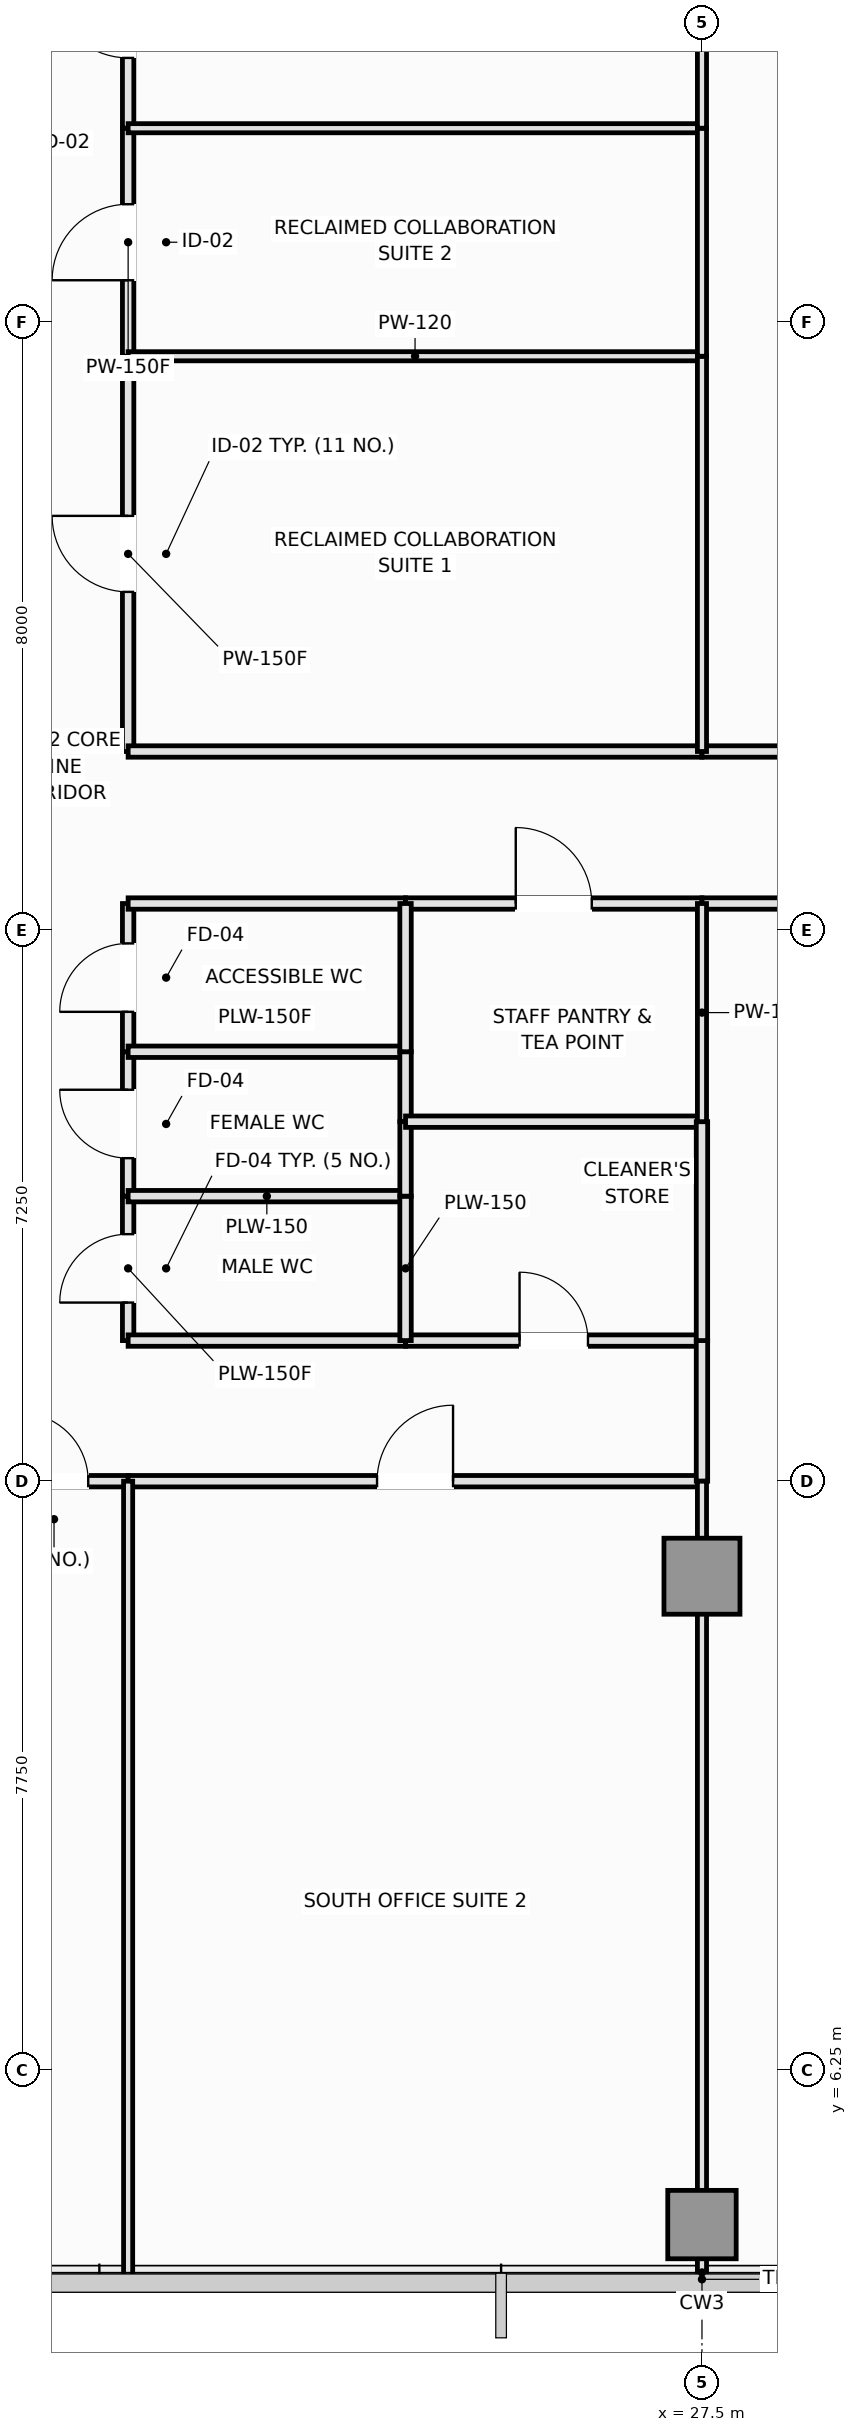
"""IFC4 building model, lengths in metres.
Left out: names, types, materials, properties, quantities, classifications, styles, units other than length and angle.
Written with IfcOpenShell. Run it as: python <this file> out.ifc"""

import sys

from ifc_helpers import new_model, si_unit, direction, frame, frame_2d, origin, origin_2d, place, context, subcontext, project, spatial, rectangle, extrude, element, fill, save


model = new_model("IFC4")
c1 = context("Model", 3, precision=1e-05, world=origin(), true_north=direction((0.0, 1.0)))
c2 = subcontext(c1, "Body", "Model", "MODEL_VIEW")
j1 = project(units=[si_unit("LENGTHUNIT", "METRE"), si_unit("PLANEANGLEUNIT", "RADIAN")], contexts=[c1])
p1 = place(None, origin())
s1 = spatial("IfcSite", under=j1, at=p1, CompositionType="ELEMENT")
p2 = place(p1, origin())
s2 = spatial("IfcBuilding", under=s1, at=p2, CompositionType="ELEMENT")
p3 = place(p2, frame((0.0, 0.0, 169.7)))
s3 = spatial("IfcBuildingStorey", under=s2, at=p3, CompositionType="ELEMENT", Elevation=169.7)
p4 = place(p3, frame((27.5, 12.75, 0.0), z_axis=(0.0, 0.0, 1.0), x_axis=(1.0, 0.0, 0.0)))
e1 = element("IfcColumn", 1, at=p4, inside=s3, PredefinedType="COLUMN", context=c2, shape_type="SweptSolid", body=[
    extrude(rectangle(XDim=1.0, YDim=1.0, at=origin_2d()), origin(), (0.0, 0.0, 1.0), 3.55),
])
p5 = place(p3, frame((27.5, 4.22, 0.0), z_axis=(0.0, 0.0, 1.0), x_axis=(1.0, 0.0, 0.0)))
e2 = element("IfcColumn", 2, at=p5, inside=s3, PredefinedType="COLUMN", context=c2, shape_type="SweptSolid", body=[
    extrude(rectangle(XDim=0.9, YDim=0.9, at=origin_2d()), origin(), (0.0, 0.0, 1.0), 3.55),
])
p6 = place(p3, frame((19.95, 15.85, 0.0), z_axis=(0.0, 0.0, 1.0), x_axis=(0.0, 1.0, 0.0)))
e3 = element("IfcWall", 3, at=p6, inside=s3, PredefinedType="PLUMBINGWALL", context=c2, shape_type="SweptSolid", body=[
    extrude(rectangle(XDim=1.9, YDim=0.15, at=frame_2d((0.95, 0.0))), origin(), (0.0, 0.0, 1.0), 3.35),
])
p7 = place(p6, frame((0.5, 0.0, 0.0)))
e4 = element("IfcOpeningElement", 4, at=p7, cuts=e3, PredefinedType="OPENING", context=c2, shape_type="SweptSolid", body=[
    extrude(rectangle(XDim=0.9, YDim=2.1, at=frame_2d((0.45, 1.05))), frame((0.0, 0.085, 0.0), z_axis=(0.0, -1.0, 0.0), x_axis=(1.0, 0.0, 0.0)), (0.0, 0.0, 1.0), 0.17),
])
p8 = place(p3, frame((19.95, 17.75, 0.0), z_axis=(0.0, 0.0, 1.0), x_axis=(0.0, 1.0, 0.0)))
e5 = element("IfcWall", 5, at=p8, inside=s3, PredefinedType="PLUMBINGWALL", context=c2, shape_type="SweptSolid", body=[
    extrude(rectangle(XDim=1.9, YDim=0.15, at=frame_2d((0.95, 0.0))), origin(), (0.0, 0.0, 1.0), 3.35),
])
p9 = place(p8, frame((0.5, 0.0, 0.0)))
e6 = element("IfcOpeningElement", 6, at=p9, cuts=e5, PredefinedType="OPENING", context=c2, shape_type="SweptSolid", body=[
    extrude(rectangle(XDim=0.9, YDim=2.1, at=frame_2d((0.45, 1.05))), frame((0.0, 0.085, 0.0), z_axis=(0.0, -1.0, 0.0), x_axis=(1.0, 0.0, 0.0)), (0.0, 0.0, 1.0), 0.17),
])
p10 = place(p3, frame((19.95, 19.65, 0.0), z_axis=(0.0, 0.0, 1.0), x_axis=(0.0, 1.0, 0.0)))
e7 = element("IfcWall", 7, at=p10, inside=s3, PredefinedType="PLUMBINGWALL", context=c2, shape_type="SweptSolid", body=[
    extrude(rectangle(XDim=1.95, YDim=0.15, at=frame_2d((0.975, 0.0))), origin(), (0.0, 0.0, 1.0), 3.35),
])
p11 = place(p10, frame((0.525, 0.0, 0.0)))
e8 = element("IfcOpeningElement", 8, at=p11, cuts=e7, PredefinedType="OPENING", context=c2, shape_type="SweptSolid", body=[
    extrude(rectangle(XDim=0.9, YDim=2.1, at=frame_2d((0.45, 1.05))), frame((0.0, 0.085, 0.0), z_axis=(0.0, -1.0, 0.0), x_axis=(1.0, 0.0, 0.0)), (0.0, 0.0, 1.0), 0.17),
])
p12 = place(p3, frame((19.95, 23.6, 0.0), z_axis=(0.0, 0.0, 1.0), x_axis=(0.0, 1.0, 0.0)))
e9 = element("IfcWall", 9, at=p12, inside=s3, PredefinedType="PARTITIONING", context=c2, shape_type="SweptSolid", body=[
    extrude(rectangle(XDim=5.2, YDim=0.15, at=frame_2d((2.6, 0.0))), origin(), (0.0, 0.0, 1.0), 3.35),
])
p13 = place(p12, frame((2.1, 0.0, 0.0)))
e10 = element("IfcOpeningElement", 10, at=p13, cuts=e9, PredefinedType="OPENING", context=c2, shape_type="SweptSolid", body=[
    extrude(rectangle(XDim=1.0, YDim=2.15, at=frame_2d((0.5, 1.075))), frame((0.0, 0.085, 0.0), z_axis=(0.0, -1.0, 0.0), x_axis=(1.0, 0.0, 0.0)), (0.0, 0.0, 1.0), 0.17),
])
p14 = place(p3, frame((19.95, 28.8, 0.0), z_axis=(0.0, 0.0, 1.0), x_axis=(0.0, 1.0, 0.0)))
e11 = element("IfcWall", 11, at=p14, inside=s3, PredefinedType="PARTITIONING", context=c2, shape_type="SweptSolid", body=[
    extrude(rectangle(XDim=3.0, YDim=0.15, at=frame_2d((1.5, 0.0))), origin(), (0.0, 0.0, 1.0), 3.35),
])
p15 = place(p14, frame((1.0, 0.0, 0.0)))
e12 = element("IfcOpeningElement", 12, at=p15, cuts=e11, PredefinedType="OPENING", context=c2, shape_type="SweptSolid", body=[
    extrude(rectangle(XDim=1.0, YDim=2.15, at=frame_2d((0.5, 1.075))), frame((0.0, 0.085, 0.0), z_axis=(0.0, -1.0, 0.0), x_axis=(1.0, 0.0, 0.0)), (0.0, 0.0, 1.0), 0.17),
])
p16 = place(p3, frame((19.95, 31.8, 0.0), z_axis=(0.0, 0.0, 1.0), x_axis=(0.0, 1.0, 0.0)))
e13 = element("IfcWall", 13, at=p16, inside=s3, PredefinedType="PARTITIONING", context=c2, shape_type="SweptSolid", body=[
    extrude(rectangle(XDim=2.85, YDim=0.15, at=frame_2d((1.425, 0.0))), origin(), (0.0, 0.0, 1.0), 3.35),
])
p17 = place(p16, frame((0.925, 0.0, 0.0)))
e14 = element("IfcOpeningElement", 14, at=p17, cuts=e13, PredefinedType="OPENING", context=c2, shape_type="SweptSolid", body=[
    extrude(rectangle(XDim=1.0, YDim=2.15, at=frame_2d((0.5, 1.075))), frame((0.0, 0.085, 0.0), z_axis=(0.0, -1.0, 0.0), x_axis=(1.0, 0.0, 0.0)), (0.0, 0.0, 1.0), 0.17),
])
p18 = place(p3, frame((18.0, 14.0, 0.0), z_axis=(0.0, 0.0, 1.0), x_axis=(1.0, 0.0, 0.0)))
e15 = element("IfcWall", 15, at=p18, inside=s3, PredefinedType="PARTITIONING", context=c2, shape_type="SweptSolid", body=[
    extrude(rectangle(XDim=1.95, YDim=0.15, at=frame_2d((0.975, 0.0))), origin(), (0.0, 0.0, 1.0), 3.35),
])
p19 = place(p18, frame((0.525, 0.0, 0.0)))
e16 = element("IfcOpeningElement", 16, at=p19, cuts=e15, PredefinedType="OPENING", context=c2, shape_type="SweptSolid", body=[
    extrude(rectangle(XDim=0.9, YDim=2.1, at=frame_2d((0.45, 1.05))), frame((0.0, 0.085, 0.0), z_axis=(0.0, -1.0, 0.0), x_axis=(1.0, 0.0, 0.0)), (0.0, 0.0, 1.0), 0.17),
])
p20 = place(p3, frame((19.95, 21.6, 0.0), z_axis=(0.0, 0.0, 1.0), x_axis=(1.0, 0.0, 0.0)))
e17 = element("IfcWall", 17, at=p20, inside=s3, PredefinedType="PLUMBINGWALL", context=c2, shape_type="SweptSolid", body=[
    extrude(rectangle(XDim=3.65, YDim=0.15, at=frame_2d((1.825, 0.0))), origin(), (0.0, 0.0, 1.0), 3.35),
])
p21 = place(p3, frame((23.6, 21.6, 0.0), z_axis=(0.0, 0.0, 1.0), x_axis=(1.0, 0.0, 0.0)))
e18 = element("IfcWall", 18, at=p21, inside=s3, PredefinedType="PARTITIONING", context=c2, shape_type="SweptSolid", body=[
    extrude(rectangle(XDim=3.9, YDim=0.15, at=frame_2d((1.95, 0.0))), origin(), (0.0, 0.0, 1.0), 3.35),
])
p22 = place(p21, frame((1.45, 0.0, 0.0)))
e19 = element("IfcOpeningElement", 19, at=p22, cuts=e18, PredefinedType="OPENING", context=c2, shape_type="SweptSolid", body=[
    extrude(rectangle(XDim=1.0, YDim=2.15, at=frame_2d((0.5, 1.075))), frame((0.0, 0.085, 0.0), z_axis=(0.0, -1.0, 0.0), x_axis=(1.0, 0.0, 0.0)), (0.0, 0.0, 1.0), 0.17),
])
p23 = place(p3, frame((19.95, 23.6, 0.0), z_axis=(0.0, 0.0, 1.0), x_axis=(1.0, 0.0, 0.0)))
e20 = element("IfcWall", 20, at=p23, inside=s3, PredefinedType="PARTITIONING", context=c2, shape_type="SweptSolid", body=[
    extrude(rectangle(XDim=7.55, YDim=0.15, at=frame_2d((3.775, 0.0))), origin(), (0.0, 0.0, 1.0), 3.35),
])
p24 = place(p3, frame((27.5, 21.6, 0.0), z_axis=(0.0, 0.0, 1.0), x_axis=(1.0, 0.0, 0.0)))
e21 = element("IfcWall", 21, at=p24, inside=s3, PredefinedType="PARTITIONING", context=c2, shape_type="SweptSolid", body=[
    extrude(rectangle(XDim=10.7, YDim=0.15, at=frame_2d((5.35, 0.0))), origin(), (0.0, 0.0, 1.0), 3.35),
])
p25 = place(p24, frame((4.85, 0.0, 0.0)))
e22 = element("IfcOpeningElement", 22, at=p25, cuts=e21, PredefinedType="OPENING", context=c2, shape_type="SweptSolid", body=[
    extrude(rectangle(XDim=1.0, YDim=2.15, at=frame_2d((0.5, 1.075))), frame((0.0, 0.085, 0.0), z_axis=(0.0, -1.0, 0.0), x_axis=(1.0, 0.0, 0.0)), (0.0, 0.0, 1.0), 0.17),
])
p26 = place(p3, frame((27.5, 23.6, 0.0), z_axis=(0.0, 0.0, 1.0), x_axis=(1.0, 0.0, 0.0)))
e23 = element("IfcWall", 23, at=p26, inside=s3, PredefinedType="PARTITIONING", context=c2, shape_type="SweptSolid", body=[
    extrude(rectangle(XDim=5.3, YDim=0.15, at=frame_2d((2.65, 0.0))), origin(), (0.0, 0.0, 1.0), 3.35),
])
p27 = place(p26, frame((2.15, 0.0, 0.0)))
e24 = element("IfcOpeningElement", 24, at=p27, cuts=e23, PredefinedType="OPENING", context=c2, shape_type="SweptSolid", body=[
    extrude(rectangle(XDim=1.0, YDim=2.15, at=frame_2d((0.5, 1.075))), frame((0.0, 0.085, 0.0), z_axis=(0.0, -1.0, 0.0), x_axis=(1.0, 0.0, 0.0)), (0.0, 0.0, 1.0), 0.17),
])
p28 = place(p3, frame((19.95, 15.85, 0.0), z_axis=(0.0, 0.0, 1.0), x_axis=(1.0, 0.0, 0.0)))
e25 = element("IfcWall", 25, at=p28, inside=s3, PredefinedType="PLUMBINGWALL", context=c2, shape_type="SweptSolid", body=[
    extrude(rectangle(XDim=3.65, YDim=0.15, at=frame_2d((1.825, 0.0))), origin(), (0.0, 0.0, 1.0), 3.35),
])
p29 = place(p3, frame((23.6, 15.85, 0.0), z_axis=(0.0, 0.0, 1.0), x_axis=(1.0, 0.0, 0.0)))
e26 = element("IfcWall", 26, at=p29, inside=s3, PredefinedType="PLUMBINGWALL", context=c2, shape_type="SweptSolid", body=[
    extrude(rectangle(XDim=3.9, YDim=0.15, at=frame_2d((1.95, 0.0))), origin(), (0.0, 0.0, 1.0), 3.35),
])
p30 = place(p29, frame((1.5, 0.0, 0.0)))
e27 = element("IfcOpeningElement", 27, at=p30, cuts=e26, PredefinedType="OPENING", context=c2, shape_type="SweptSolid", body=[
    extrude(rectangle(XDim=0.9, YDim=2.1, at=frame_2d((0.45, 1.05))), frame((0.0, 0.085, 0.0), z_axis=(0.0, -1.0, 0.0), x_axis=(1.0, 0.0, 0.0)), (0.0, 0.0, 1.0), 0.17),
])
p31 = place(p3, frame((19.95, 14.0, 0.0), z_axis=(0.0, 0.0, 1.0), x_axis=(1.0, 0.0, 0.0)))
e28 = element("IfcWall", 28, at=p31, inside=s3, PredefinedType="PARTITIONING", context=c2, shape_type="SweptSolid", body=[
    extrude(rectangle(XDim=7.55, YDim=0.15, at=frame_2d((3.775, 0.0))), origin(), (0.0, 0.0, 1.0), 3.35),
])
p32 = place(p31, frame((3.275, 0.0, 0.0)))
e29 = element("IfcOpeningElement", 29, at=p32, cuts=e28, PredefinedType="OPENING", context=c2, shape_type="SweptSolid", body=[
    extrude(rectangle(XDim=1.0, YDim=2.15, at=frame_2d((0.5, 1.075))), frame((0.0, 0.085, 0.0), z_axis=(0.0, -1.0, 0.0), x_axis=(1.0, 0.0, 0.0)), (0.0, 0.0, 1.0), 0.17),
])
p33 = place(p3, frame((27.5, 14.0, 0.0), z_axis=(0.0, 0.0, 1.0), x_axis=(0.0, 1.0, 0.0)))
e30 = element("IfcWall", 30, at=p33, inside=s3, PredefinedType="PARTITIONING", context=c2, shape_type="SweptSolid", body=[
    extrude(rectangle(XDim=1.85, YDim=0.15, at=frame_2d((0.925, 0.0))), origin(), (0.0, 0.0, 1.0), 3.35),
])
p34 = place(p3, frame((19.95, 17.75, 0.0), z_axis=(0.0, 0.0, 1.0), x_axis=(1.0, 0.0, 0.0)))
e31 = element("IfcWall", 31, at=p34, inside=s3, PredefinedType="PLUMBINGWALL", context=c2, shape_type="SweptSolid", body=[
    extrude(rectangle(XDim=3.65, YDim=0.15, at=frame_2d((1.825, 0.0))), origin(), (0.0, 0.0, 1.0), 3.35),
])
p35 = place(p3, frame((23.6, 15.85, 0.0), z_axis=(0.0, 0.0, 1.0), x_axis=(0.0, 1.0, 0.0)))
e32 = element("IfcWall", 32, at=p35, inside=s3, PredefinedType="PLUMBINGWALL", context=c2, shape_type="SweptSolid", body=[
    extrude(rectangle(XDim=1.9, YDim=0.15, at=frame_2d((0.95, 0.0))), origin(), (0.0, 0.0, 1.0), 3.35),
])
p36 = place(p3, frame((19.95, 19.65, 0.0), z_axis=(0.0, 0.0, 1.0), x_axis=(1.0, 0.0, 0.0)))
e33 = element("IfcWall", 33, at=p36, inside=s3, PredefinedType="PLUMBINGWALL", context=c2, shape_type="SweptSolid", body=[
    extrude(rectangle(XDim=3.65, YDim=0.15, at=frame_2d((1.825, 0.0))), origin(), (0.0, 0.0, 1.0), 3.35),
])
p37 = place(p3, frame((23.6, 17.75, 0.0), z_axis=(0.0, 0.0, 1.0), x_axis=(0.0, 1.0, 0.0)))
e34 = element("IfcWall", 34, at=p37, inside=s3, PredefinedType="PLUMBINGWALL", context=c2, shape_type="SweptSolid", body=[
    extrude(rectangle(XDim=0.98, YDim=0.15, at=frame_2d((0.49, 0.0))), origin(), (0.0, 0.0, 1.0), 3.35),
])
p38 = place(p3, frame((23.6, 18.73, 0.0), z_axis=(0.0, 0.0, 1.0), x_axis=(0.0, 1.0, 0.0)))
e35 = element("IfcWall", 35, at=p38, inside=s3, PredefinedType="PLUMBINGWALL", context=c2, shape_type="SweptSolid", body=[
    extrude(rectangle(XDim=0.92, YDim=0.15, at=frame_2d((0.46, 0.0))), origin(), (0.0, 0.0, 1.0), 3.35),
])
p39 = place(p3, frame((23.6, 19.65, 0.0), z_axis=(0.0, 0.0, 1.0), x_axis=(0.0, 1.0, 0.0)))
e36 = element("IfcWall", 36, at=p39, inside=s3, PredefinedType="PLUMBINGWALL", context=c2, shape_type="SweptSolid", body=[
    extrude(rectangle(XDim=1.95, YDim=0.15, at=frame_2d((0.975, 0.0))), origin(), (0.0, 0.0, 1.0), 3.35),
])
p40 = place(p3, frame((23.6, 18.73, 0.0), z_axis=(0.0, 0.0, 1.0), x_axis=(1.0, 0.0, 0.0)))
e37 = element("IfcWall", 37, at=p40, inside=s3, PredefinedType="PLUMBINGWALL", context=c2, shape_type="SweptSolid", body=[
    extrude(rectangle(XDim=3.9, YDim=0.15, at=frame_2d((1.95, 0.0))), origin(), (0.0, 0.0, 1.0), 3.35),
])
p41 = place(p3, frame((27.5, 15.85, 0.0), z_axis=(0.0, 0.0, 1.0), x_axis=(0.0, 1.0, 0.0)))
e38 = element("IfcWall", 38, at=p41, inside=s3, PredefinedType="PLUMBINGWALL", context=c2, shape_type="SweptSolid", body=[
    extrude(rectangle(XDim=2.88, YDim=0.15, at=frame_2d((1.44, 0.0))), origin(), (0.0, 0.0, 1.0), 3.35),
])
p42 = place(p3, frame((27.5, 18.73, 0.0), z_axis=(0.0, 0.0, 1.0), x_axis=(0.0, 1.0, 0.0)))
e39 = element("IfcWall", 39, at=p42, inside=s3, PredefinedType="PARTITIONING", context=c2, shape_type="SweptSolid", body=[
    extrude(rectangle(XDim=2.87, YDim=0.12, at=frame_2d((1.435, 0.0))), origin(), (0.0, 0.0, 1.0), 3.35),
])
p43 = place(p3, frame((19.95, 28.8, 0.0), z_axis=(0.0, 0.0, 1.0), x_axis=(1.0, 0.0, 0.0)))
e40 = element("IfcWall", 40, at=p43, inside=s3, PredefinedType="PARTITIONING", context=c2, shape_type="SweptSolid", body=[
    extrude(rectangle(XDim=7.55, YDim=0.12, at=frame_2d((3.775, 0.0))), origin(), (0.0, 0.0, 1.0), 3.35),
])
p44 = place(p3, frame((27.5, 23.6, 0.0), z_axis=(0.0, 0.0, 1.0), x_axis=(0.0, 1.0, 0.0)))
e41 = element("IfcWall", 41, at=p44, inside=s3, PredefinedType="PARTITIONING", context=c2, shape_type="SweptSolid", body=[
    extrude(rectangle(XDim=5.2, YDim=0.12, at=frame_2d((2.6, 0.0))), origin(), (0.0, 0.0, 1.0), 3.35),
])
p45 = place(p3, frame((19.95, 31.8, 0.0), z_axis=(0.0, 0.0, 1.0), x_axis=(1.0, 0.0, 0.0)))
e42 = element("IfcWall", 42, at=p45, inside=s3, PredefinedType="PARTITIONING", context=c2, shape_type="SweptSolid", body=[
    extrude(rectangle(XDim=7.55, YDim=0.12, at=frame_2d((3.775, 0.0))), origin(), (0.0, 0.0, 1.0), 3.35),
])
p46 = place(p3, frame((27.5, 28.8, 0.0), z_axis=(0.0, 0.0, 1.0), x_axis=(0.0, 1.0, 0.0)))
e43 = element("IfcWall", 43, at=p46, inside=s3, PredefinedType="PARTITIONING", context=c2, shape_type="SweptSolid", body=[
    extrude(rectangle(XDim=3.0, YDim=0.12, at=frame_2d((1.5, 0.0))), origin(), (0.0, 0.0, 1.0), 3.35),
])
p47 = place(p3, frame((27.5, 31.8, 0.0), z_axis=(0.0, 0.0, 1.0), x_axis=(0.0, 1.0, 0.0)))
e44 = element("IfcWall", 44, at=p47, inside=s3, PredefinedType="PARTITIONING", context=c2, shape_type="SweptSolid", body=[
    extrude(rectangle(XDim=2.85, YDim=0.12, at=frame_2d((1.425, 0.0))), origin(), (0.0, 0.0, 1.0), 3.35),
])
p48 = place(p3, frame((19.95, 3.51, 0.0), z_axis=(0.0, 0.0, 1.0), x_axis=(0.0, 1.0, 0.0)))
e45 = element("IfcWall", 45, at=p48, inside=s3, PredefinedType="PARTITIONING", context=c2, shape_type="SweptSolid", body=[
    extrude(rectangle(XDim=10.49, YDim=0.12, at=frame_2d((5.245, 0.0))), origin(), (0.0, 0.0, 1.0), 3.35),
])
p49 = place(p3, frame((27.5, 3.51, 0.0), z_axis=(0.0, 0.0, 1.0), x_axis=(0.0, 1.0, 0.0)))
e46 = element("IfcWall", 46, at=p49, inside=s3, PredefinedType="PARTITIONING", context=c2, shape_type="SweptSolid", body=[
    extrude(rectangle(XDim=10.49, YDim=0.12, at=frame_2d((5.245, 0.0))), origin(), (0.0, 0.0, 1.0), 2.85),
])
p50 = place(p7, origin())
e47 = element("IfcDoor", 47, at=p50, inside=s3, OperationType="SINGLE_SWING_LEFT", PredefinedType="DOOR", context=c2, shape_type="SweptSolid", body=[
    extrude(rectangle(XDim=0.9, YDim=2.1, at=frame_2d((0.45, 1.05))), frame((0.0, 0.025, 0.0), z_axis=(0.0, -1.0, 0.0), x_axis=(1.0, 0.0, 0.0)), (0.0, 0.0, 1.0), 0.05),
])
fill(e4, e47)
p51 = place(p9, origin())
e48 = element("IfcDoor", 48, at=p51, inside=s3, OperationType="SINGLE_SWING_RIGHT", PredefinedType="DOOR", context=c2, shape_type="SweptSolid", body=[
    extrude(rectangle(XDim=0.9, YDim=2.1, at=frame_2d((0.45, 1.05))), frame((0.0, 0.025, 0.0), z_axis=(0.0, -1.0, 0.0), x_axis=(1.0, 0.0, 0.0)), (0.0, 0.0, 1.0), 0.05),
])
fill(e6, e48)
p52 = place(p11, origin())
e49 = element("IfcDoor", 49, at=p52, inside=s3, OperationType="SINGLE_SWING_LEFT", PredefinedType="DOOR", context=c2, shape_type="SweptSolid", body=[
    extrude(rectangle(XDim=0.9, YDim=2.1, at=frame_2d((0.45, 1.05))), frame((0.0, 0.025, 0.0), z_axis=(0.0, -1.0, 0.0), x_axis=(1.0, 0.0, 0.0)), (0.0, 0.0, 1.0), 0.05),
])
fill(e8, e49)
p53 = place(p13, origin())
e50 = element("IfcDoor", 50, at=p53, inside=s3, OperationType="SINGLE_SWING_RIGHT", PredefinedType="DOOR", context=c2, shape_type="SweptSolid", body=[
    extrude(rectangle(XDim=1.0, YDim=2.15, at=frame_2d((0.5, 1.075))), frame((0.0, 0.025, 0.0), z_axis=(0.0, -1.0, 0.0), x_axis=(1.0, 0.0, 0.0)), (0.0, 0.0, 1.0), 0.05),
])
fill(e10, e50)
p54 = place(p15, origin())
e51 = element("IfcDoor", 51, at=p54, inside=s3, OperationType="SINGLE_SWING_LEFT", PredefinedType="DOOR", context=c2, shape_type="SweptSolid", body=[
    extrude(rectangle(XDim=1.0, YDim=2.15, at=frame_2d((0.5, 1.075))), frame((0.0, 0.025, 0.0), z_axis=(0.0, -1.0, 0.0), x_axis=(1.0, 0.0, 0.0)), (0.0, 0.0, 1.0), 0.05),
])
fill(e12, e51)
p55 = place(p17, origin())
e52 = element("IfcDoor", 52, at=p55, inside=s3, OperationType="SINGLE_SWING_RIGHT", PredefinedType="DOOR", context=c2, shape_type="SweptSolid", body=[
    extrude(rectangle(XDim=1.0, YDim=2.15, at=frame_2d((0.5, 1.075))), frame((0.0, 0.025, 0.0), z_axis=(0.0, -1.0, 0.0), x_axis=(1.0, 0.0, 0.0)), (0.0, 0.0, 1.0), 0.05),
])
fill(e14, e52)
p56 = place(p19, origin())
e53 = element("IfcDoor", 53, at=p56, inside=s3, OperationType="SINGLE_SWING_LEFT", PredefinedType="DOOR", context=c2, shape_type="SweptSolid", body=[
    extrude(rectangle(XDim=0.9, YDim=2.1, at=frame_2d((0.45, 1.05))), frame((0.0, 0.025, 0.0), z_axis=(0.0, -1.0, 0.0), x_axis=(1.0, 0.0, 0.0)), (0.0, 0.0, 1.0), 0.05),
])
fill(e16, e53)
p57 = place(p22, origin())
e54 = element("IfcDoor", 54, at=p57, inside=s3, OperationType="SINGLE_SWING_LEFT", PredefinedType="DOOR", context=c2, shape_type="SweptSolid", body=[
    extrude(rectangle(XDim=1.0, YDim=2.15, at=frame_2d((0.5, 1.075))), frame((0.0, 0.025, 0.0), z_axis=(0.0, -1.0, 0.0), x_axis=(1.0, 0.0, 0.0)), (0.0, 0.0, 1.0), 0.05),
])
fill(e19, e54)
p58 = place(p30, origin())
e55 = element("IfcDoor", 55, at=p58, inside=s3, OperationType="SINGLE_SWING_LEFT", PredefinedType="DOOR", context=c2, shape_type="SweptSolid", body=[
    extrude(rectangle(XDim=0.9, YDim=2.1, at=frame_2d((0.45, 1.05))), frame((0.0, 0.025, 0.0), z_axis=(0.0, -1.0, 0.0), x_axis=(1.0, 0.0, 0.0)), (0.0, 0.0, 1.0), 0.05),
])
fill(e27, e55)
p59 = place(p32, origin())
e56 = element("IfcDoor", 56, at=p59, inside=s3, OperationType="SINGLE_SWING_RIGHT", PredefinedType="DOOR", context=c2, shape_type="SweptSolid", body=[
    extrude(rectangle(XDim=1.0, YDim=2.15, at=frame_2d((0.5, 1.075))), frame((0.0, 0.025, 0.0), z_axis=(0.0, -1.0, 0.0), x_axis=(1.0, 0.0, 0.0)), (0.0, 0.0, 1.0), 0.05),
])
fill(e29, e56)
save(model, sys.argv[1])
